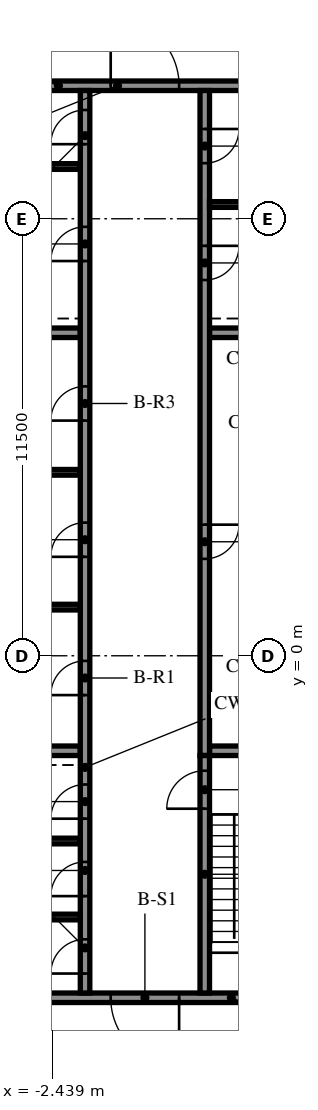
"""IFC4 building model, lengths in metres.
Left out: names, types, materials, properties, quantities, classifications, styles, units other than length and angle.
Written with IfcOpenShell. Run it as: python <this file> out.ifc"""

import sys

from ifc_helpers import new_model, si_unit, direction, frame, frame_2d, origin, place, context, subcontext, project, spatial, rectangle, extrude, element, fill, save


model = new_model("IFC4")
c1 = context("Model", 3, precision=1e-05, world=origin(), true_north=direction((0.0, 1.0)))
c2 = subcontext(c1, "Body", "Model", "MODEL_VIEW")
j1 = project(units=[si_unit("LENGTHUNIT", "METRE"), si_unit("PLANEANGLEUNIT", "RADIAN")], contexts=[c1])
p1 = place(None, origin())
s1 = spatial("IfcSite", under=j1, at=p1, CompositionType="ELEMENT")
p2 = place(p1, origin())
s2 = spatial("IfcBuilding", under=s1, at=p2, CompositionType="ELEMENT")
p3 = place(p2, frame((0.0, 0.0, 46.0)))
s3 = spatial("IfcBuildingStorey", under=s2, at=p3, CompositionType="ELEMENT", Elevation=46.0)
p4 = place(p3, frame((4.55, -9.0, 0.0), z_axis=(0.0, 0.0, 1.0), x_axis=(-1.0, 0.0, 0.0)))
e1 = element("IfcWall", 1, at=p4, inside=s3, PredefinedType="SOLIDWALL", context=c2, shape_type="SweptSolid", body=[
    extrude(rectangle(XDim=9.1, YDim=0.25, at=frame_2d((4.55, 0.0))), origin(), (0.0, 0.0, 1.0), 3.96),
])
p5 = place(p4, frame((3.65, 0.0, 0.0)))
e2 = element("IfcOpeningElement", 2, at=p5, cuts=e1, PredefinedType="OPENING", context=c2, shape_type="SweptSolid", body=[
    extrude(rectangle(XDim=1.8, YDim=2.1, at=frame_2d((0.9, 1.05))), frame((0.0, 0.135, 0.0), z_axis=(0.0, -1.0, 0.0), x_axis=(1.0, 0.0, 0.0)), (0.0, 0.0, 1.0), 0.27),
])
p6 = place(p3, frame((-4.55, 15.0, 0.0), z_axis=(0.0, 0.0, 1.0), x_axis=(1.0, 0.0, 0.0)))
e3 = element("IfcWall", 3, at=p6, inside=s3, PredefinedType="SOLIDWALL", context=c2, shape_type="SweptSolid", body=[
    extrude(rectangle(XDim=9.1, YDim=0.25, at=frame_2d((4.55, 0.0))), origin(), (0.0, 0.0, 1.0), 3.96),
])
p7 = place(p6, frame((3.65, 0.0, 0.0)))
e4 = element("IfcOpeningElement", 4, at=p7, cuts=e3, PredefinedType="OPENING", context=c2, shape_type="SweptSolid", body=[
    extrude(rectangle(XDim=1.8, YDim=2.1, at=frame_2d((0.9, 1.05))), frame((0.0, 0.135, 0.0), z_axis=(0.0, -1.0, 0.0), x_axis=(1.0, 0.0, 0.0)), (0.0, 0.0, 1.0), 0.27),
])
p8 = place(p3, frame((-1.575, -8.875, 0.0), z_axis=(0.0, 0.0, 1.0), x_axis=(0.0, 1.0, 0.0)))
e5 = element("IfcWall", 5, at=p8, inside=s3, PredefinedType="SOLIDWALL", context=c2, shape_type="SweptSolid", body=[
    extrude(rectangle(XDim=23.75, YDim=0.25, at=frame_2d((11.875, 0.0))), origin(), (0.0, 0.0, 1.0), 3.96),
])
p9 = place(p8, frame((7.84, 0.0, 0.0)))
e6 = element("IfcOpeningElement", 6, at=p9, cuts=e5, PredefinedType="OPENING", context=c2, shape_type="SweptSolid", body=[
    extrude(rectangle(XDim=0.9, YDim=2.1, at=frame_2d((0.45, 1.05))), frame((0.0, 0.135, 0.0), z_axis=(0.0, -1.0, 0.0), x_axis=(1.0, 0.0, 0.0)), (0.0, 0.0, 1.0), 0.27),
])
p10 = place(p8, frame((11.479, 0.0, 0.0)))
e7 = element("IfcOpeningElement", 7, at=p10, cuts=e5, PredefinedType="OPENING", context=c2, shape_type="SweptSolid", body=[
    extrude(rectangle(XDim=0.9, YDim=2.1, at=frame_2d((0.45, 1.05))), frame((0.0, 0.135, 0.0), z_axis=(0.0, -1.0, 0.0), x_axis=(1.0, 0.0, 0.0)), (0.0, 0.0, 1.0), 0.27),
])
p11 = place(p8, frame((15.064, 0.0, 0.0)))
e8 = element("IfcOpeningElement", 8, at=p11, cuts=e5, PredefinedType="OPENING", context=c2, shape_type="SweptSolid", body=[
    extrude(rectangle(XDim=0.9, YDim=2.1, at=frame_2d((0.45, 1.05))), frame((0.0, 0.135, 0.0), z_axis=(0.0, -1.0, 0.0), x_axis=(1.0, 0.0, 0.0)), (0.0, 0.0, 1.0), 0.27),
])
p12 = place(p8, frame((0.512, 0.0, 0.0)))
e9 = element("IfcOpeningElement", 9, at=p12, cuts=e5, PredefinedType="OPENING", context=c2, shape_type="SweptSolid", body=[
    extrude(rectangle(XDim=0.9, YDim=2.1, at=frame_2d((0.45, 1.05))), frame((0.0, 0.135, 0.0), z_axis=(0.0, -1.0, 0.0), x_axis=(1.0, 0.0, 0.0)), (0.0, 0.0, 1.0), 0.27),
])
p13 = place(p8, frame((2.55, 0.0, 0.0)))
e10 = element("IfcOpeningElement", 10, at=p13, cuts=e5, PredefinedType="OPENING", context=c2, shape_type="SweptSolid", body=[
    extrude(rectangle(XDim=0.9, YDim=2.1, at=frame_2d((0.45, 1.05))), frame((0.0, 0.135, 0.0), z_axis=(0.0, -1.0, 0.0), x_axis=(1.0, 0.0, 0.0)), (0.0, 0.0, 1.0), 0.27),
])
p14 = place(p8, frame((4.587, 0.0, 0.0)))
e11 = element("IfcOpeningElement", 11, at=p14, cuts=e5, PredefinedType="OPENING", context=c2, shape_type="SweptSolid", body=[
    extrude(rectangle(XDim=0.9, YDim=2.1, at=frame_2d((0.45, 1.05))), frame((0.0, 0.135, 0.0), z_axis=(0.0, -1.0, 0.0), x_axis=(1.0, 0.0, 0.0)), (0.0, 0.0, 1.0), 0.27),
])
p15 = place(p8, frame((19.262, 0.0, 0.0)))
e12 = element("IfcOpeningElement", 12, at=p15, cuts=e5, PredefinedType="OPENING", context=c2, shape_type="SweptSolid", body=[
    extrude(rectangle(XDim=0.9, YDim=2.1, at=frame_2d((0.45, 1.05))), frame((0.0, 0.135, 0.0), z_axis=(0.0, -1.0, 0.0), x_axis=(1.0, 0.0, 0.0)), (0.0, 0.0, 1.0), 0.27),
])
p16 = place(p8, frame((22.337, 0.0, 0.0)))
e13 = element("IfcOpeningElement", 13, at=p16, cuts=e5, PredefinedType="OPENING", context=c2, shape_type="SweptSolid", body=[
    extrude(rectangle(XDim=0.9, YDim=2.1, at=frame_2d((0.45, 1.05))), frame((0.0, 0.135, 0.0), z_axis=(0.0, -1.0, 0.0), x_axis=(1.0, 0.0, 0.0)), (0.0, 0.0, 1.0), 0.27),
])
p17 = place(p3, frame((1.575, -8.875, 0.0), z_axis=(0.0, 0.0, 1.0), x_axis=(0.0, 1.0, 0.0)))
e14 = element("IfcWall", 14, at=p17, inside=s3, PredefinedType="SOLIDWALL", context=c2, shape_type="SweptSolid", body=[
    extrude(rectangle(XDim=6.25, YDim=0.25, at=frame_2d((3.125, 0.0))), origin(), (0.0, 0.0, 1.0), 3.96),
])
p18 = place(p17, frame((4.85, 0.0, 0.0)))
e15 = element("IfcOpeningElement", 15, at=p18, cuts=e14, PredefinedType="OPENING", context=c2, shape_type="SweptSolid", body=[
    extrude(rectangle(XDim=1.0, YDim=2.1, at=frame_2d((0.5, 1.05))), frame((0.0, 0.135, 0.0), z_axis=(0.0, -1.0, 0.0), x_axis=(1.0, 0.0, 0.0)), (0.0, 0.0, 1.0), 0.27),
])
p19 = place(p3, frame((1.575, 14.875, 0.0), z_axis=(0.0, 0.0, 1.0), x_axis=(0.0, -1.0, 0.0)))
e16 = element("IfcWall", 16, at=p19, inside=s3, PredefinedType="SOLIDWALL", context=c2, shape_type="SweptSolid", body=[
    extrude(rectangle(XDim=17.5, YDim=0.25, at=frame_2d((8.75, 0.0))), origin(), (0.0, 0.0, 1.0), 3.96),
])
p20 = place(p19, frame((11.425, 0.0, 0.0)))
e17 = element("IfcOpeningElement", 17, at=p20, cuts=e16, PredefinedType="OPENING", context=c2, shape_type="SweptSolid", body=[
    extrude(rectangle(XDim=0.9, YDim=2.1, at=frame_2d((0.45, 1.05))), frame((0.0, 0.135, 0.0), z_axis=(0.0, -1.0, 0.0), x_axis=(1.0, 0.0, 0.0)), (0.0, 0.0, 1.0), 0.27),
])
p21 = place(p19, frame((4.087, 0.0, 0.0)))
e18 = element("IfcOpeningElement", 18, at=p21, cuts=e16, PredefinedType="OPENING", context=c2, shape_type="SweptSolid", body=[
    extrude(rectangle(XDim=0.9, YDim=2.1, at=frame_2d((0.45, 1.05))), frame((0.0, 0.135, 0.0), z_axis=(0.0, -1.0, 0.0), x_axis=(1.0, 0.0, 0.0)), (0.0, 0.0, 1.0), 0.27),
])
p22 = place(p19, frame((1.012, 0.0, 0.0)))
e19 = element("IfcOpeningElement", 19, at=p22, cuts=e16, PredefinedType="OPENING", context=c2, shape_type="SweptSolid", body=[
    extrude(rectangle(XDim=0.9, YDim=2.1, at=frame_2d((0.45, 1.05))), frame((0.0, 0.135, 0.0), z_axis=(0.0, -1.0, 0.0), x_axis=(1.0, 0.0, 0.0)), (0.0, 0.0, 1.0), 0.27),
])
for number, where, z_axis, x_axis in (
    (20, (-4.55, -2.5, 0.0), (0.0, 0.0, 1.0), (1.0, 0.0, 0.0)),
    (21, (-4.55, 8.5, 0.0), (0.0, 0.0, 1.0), (1.0, 0.0, 0.0)),
    (22, (1.7, -2.5, 0.0), (0.0, 0.0, 1.0), (1.0, 0.0, 0.0)),
    (23, (1.7, 8.5, 0.0), (0.0, 0.0, 1.0), (1.0, 0.0, 0.0)),
):
    element("IfcWall", number, at=place(p3, frame(where, z_axis=z_axis, x_axis=x_axis)), inside=s3, PredefinedType="SOLIDWALL", context=c2, shape_type="SweptSolid", body=[
        extrude(rectangle(XDim=2.85, YDim=0.25, at=frame_2d((1.425, 0.0))), origin(), (0.0, 0.0, 1.0), 3.96),
    ])
for number, where, z_axis, x_axis in (
    (24, (-4.55, 1.28, 0.0), (0.0, 0.0, 1.0), (1.0, 0.0, 0.0)),
    (25, (-4.55, 4.827, 0.0), (0.0, 0.0, 1.0), (1.0, 0.0, 0.0)),
    (26, (-4.55, -6.875, 0.0), (0.0, 0.0, 1.0), (1.0, 0.0, 0.0)),
    (27, (-4.55, -4.875, 0.0), (0.0, 0.0, 1.0), (1.0, 0.0, 0.0)),
    (28, (-4.55, 12.875, 0.0), (0.0, 0.0, 1.0), (1.0, 0.0, 0.0)),
    (29, (1.7, 11.875, 0.0), (0.0, 0.0, 1.0), (1.0, 0.0, 0.0)),
):
    element("IfcWall", number, at=place(p3, frame(where, z_axis=z_axis, x_axis=x_axis)), inside=s3, PredefinedType="PARTITIONING", context=c2, shape_type="SweptSolid", body=[
        extrude(rectangle(XDim=2.85, YDim=0.15, at=frame_2d((1.425, 0.0))), origin(), (0.0, 0.0, 1.0), 3.96),
    ])
p23 = place(p5, origin())
e30 = element("IfcDoor", 30, at=p23, inside=s3, OperationType="DOUBLE_DOOR_SINGLE_SWING", PredefinedType="DOOR", context=c2, shape_type="SweptSolid", body=[
    extrude(rectangle(XDim=1.8, YDim=2.1, at=frame_2d((0.9, 1.05))), frame((0.0, 0.025, 0.0), z_axis=(0.0, -1.0, 0.0), x_axis=(1.0, 0.0, 0.0)), (0.0, 0.0, 1.0), 0.05),
])
fill(e2, e30)
p24 = place(p7, origin())
e31 = element("IfcDoor", 31, at=p24, inside=s3, OperationType="DOUBLE_DOOR_SINGLE_SWING", PredefinedType="DOOR", context=c2, shape_type="SweptSolid", body=[
    extrude(rectangle(XDim=1.8, YDim=2.1, at=frame_2d((0.9, 1.05))), frame((0.0, 0.025, 0.0), z_axis=(0.0, -1.0, 0.0), x_axis=(1.0, 0.0, 0.0)), (0.0, 0.0, 1.0), 0.05),
])
fill(e4, e31)
p25 = place(p9, origin())
e32 = element("IfcDoor", 32, at=p25, inside=s3, OperationType="SINGLE_SWING_LEFT", PredefinedType="DOOR", context=c2, shape_type="SweptSolid", body=[
    extrude(rectangle(XDim=0.9, YDim=2.1, at=frame_2d((0.45, 1.05))), frame((0.0, 0.025, 0.0), z_axis=(0.0, -1.0, 0.0), x_axis=(1.0, 0.0, 0.0)), (0.0, 0.0, 1.0), 0.05),
])
fill(e6, e32)
p26 = place(p10, origin())
e33 = element("IfcDoor", 33, at=p26, inside=s3, OperationType="SINGLE_SWING_RIGHT", PredefinedType="DOOR", context=c2, shape_type="SweptSolid", body=[
    extrude(rectangle(XDim=0.9, YDim=2.1, at=frame_2d((0.45, 1.05))), frame((0.0, 0.025, 0.0), z_axis=(0.0, -1.0, 0.0), x_axis=(1.0, 0.0, 0.0)), (0.0, 0.0, 1.0), 0.05),
])
fill(e7, e33)
p27 = place(p11, origin())
e34 = element("IfcDoor", 34, at=p27, inside=s3, OperationType="SINGLE_SWING_LEFT", PredefinedType="DOOR", context=c2, shape_type="SweptSolid", body=[
    extrude(rectangle(XDim=0.9, YDim=2.1, at=frame_2d((0.45, 1.05))), frame((0.0, 0.025, 0.0), z_axis=(0.0, -1.0, 0.0), x_axis=(1.0, 0.0, 0.0)), (0.0, 0.0, 1.0), 0.05),
])
fill(e8, e34)
p28 = place(p20, origin())
e35 = element("IfcDoor", 35, at=p28, inside=s3, OperationType="SINGLE_SWING_RIGHT", PredefinedType="DOOR", context=c2, shape_type="SweptSolid", body=[
    extrude(rectangle(XDim=0.9, YDim=2.1, at=frame_2d((0.45, 1.05))), frame((0.0, 0.025, 0.0), z_axis=(0.0, -1.0, 0.0), x_axis=(1.0, 0.0, 0.0)), (0.0, 0.0, 1.0), 0.05),
])
fill(e17, e35)
p29 = place(p12, origin())
e36 = element("IfcDoor", 36, at=p29, inside=s3, OperationType="SINGLE_SWING_LEFT", PredefinedType="DOOR", context=c2, shape_type="SweptSolid", body=[
    extrude(rectangle(XDim=0.9, YDim=2.1, at=frame_2d((0.45, 1.05))), frame((0.0, 0.025, 0.0), z_axis=(0.0, -1.0, 0.0), x_axis=(1.0, 0.0, 0.0)), (0.0, 0.0, 1.0), 0.05),
])
fill(e9, e36)
p30 = place(p13, origin())
e37 = element("IfcDoor", 37, at=p30, inside=s3, OperationType="SINGLE_SWING_RIGHT", PredefinedType="DOOR", context=c2, shape_type="SweptSolid", body=[
    extrude(rectangle(XDim=0.9, YDim=2.1, at=frame_2d((0.45, 1.05))), frame((0.0, 0.025, 0.0), z_axis=(0.0, -1.0, 0.0), x_axis=(1.0, 0.0, 0.0)), (0.0, 0.0, 1.0), 0.05),
])
fill(e10, e37)
p31 = place(p14, origin())
e38 = element("IfcDoor", 38, at=p31, inside=s3, OperationType="SINGLE_SWING_LEFT", PredefinedType="DOOR", context=c2, shape_type="SweptSolid", body=[
    extrude(rectangle(XDim=0.9, YDim=2.1, at=frame_2d((0.45, 1.05))), frame((0.0, 0.025, 0.0), z_axis=(0.0, -1.0, 0.0), x_axis=(1.0, 0.0, 0.0)), (0.0, 0.0, 1.0), 0.05),
])
fill(e11, e38)
p32 = place(p15, origin())
e39 = element("IfcDoor", 39, at=p32, inside=s3, OperationType="SINGLE_SWING_RIGHT", PredefinedType="DOOR", context=c2, shape_type="SweptSolid", body=[
    extrude(rectangle(XDim=0.9, YDim=2.1, at=frame_2d((0.45, 1.05))), frame((0.0, 0.025, 0.0), z_axis=(0.0, -1.0, 0.0), x_axis=(1.0, 0.0, 0.0)), (0.0, 0.0, 1.0), 0.05),
])
fill(e12, e39)
p33 = place(p16, origin())
e40 = element("IfcDoor", 40, at=p33, inside=s3, OperationType="SINGLE_SWING_LEFT", PredefinedType="DOOR", context=c2, shape_type="SweptSolid", body=[
    extrude(rectangle(XDim=0.9, YDim=2.1, at=frame_2d((0.45, 1.05))), frame((0.0, 0.025, 0.0), z_axis=(0.0, -1.0, 0.0), x_axis=(1.0, 0.0, 0.0)), (0.0, 0.0, 1.0), 0.05),
])
fill(e13, e40)
p34 = place(p21, origin())
e41 = element("IfcDoor", 41, at=p34, inside=s3, OperationType="SINGLE_SWING_RIGHT", PredefinedType="DOOR", context=c2, shape_type="SweptSolid", body=[
    extrude(rectangle(XDim=0.9, YDim=2.1, at=frame_2d((0.45, 1.05))), frame((0.0, 0.025, 0.0), z_axis=(0.0, -1.0, 0.0), x_axis=(1.0, 0.0, 0.0)), (0.0, 0.0, 1.0), 0.05),
])
fill(e18, e41)
p35 = place(p22, origin())
e42 = element("IfcDoor", 42, at=p35, inside=s3, OperationType="SINGLE_SWING_LEFT", PredefinedType="DOOR", context=c2, shape_type="SweptSolid", body=[
    extrude(rectangle(XDim=0.9, YDim=2.1, at=frame_2d((0.45, 1.05))), frame((0.0, 0.025, 0.0), z_axis=(0.0, -1.0, 0.0), x_axis=(1.0, 0.0, 0.0)), (0.0, 0.0, 1.0), 0.05),
])
fill(e19, e42)
p36 = place(p18, origin())
e43 = element("IfcDoor", 43, at=p36, inside=s3, OperationType="SINGLE_SWING_RIGHT", PredefinedType="DOOR", context=c2, shape_type="SweptSolid", body=[
    extrude(rectangle(XDim=1.0, YDim=2.1, at=frame_2d((0.5, 1.05))), frame((0.0, 0.025, 0.0), z_axis=(0.0, -1.0, 0.0), x_axis=(1.0, 0.0, 0.0)), (0.0, 0.0, 1.0), 0.05),
])
fill(e15, e43)
save(model, sys.argv[1])
